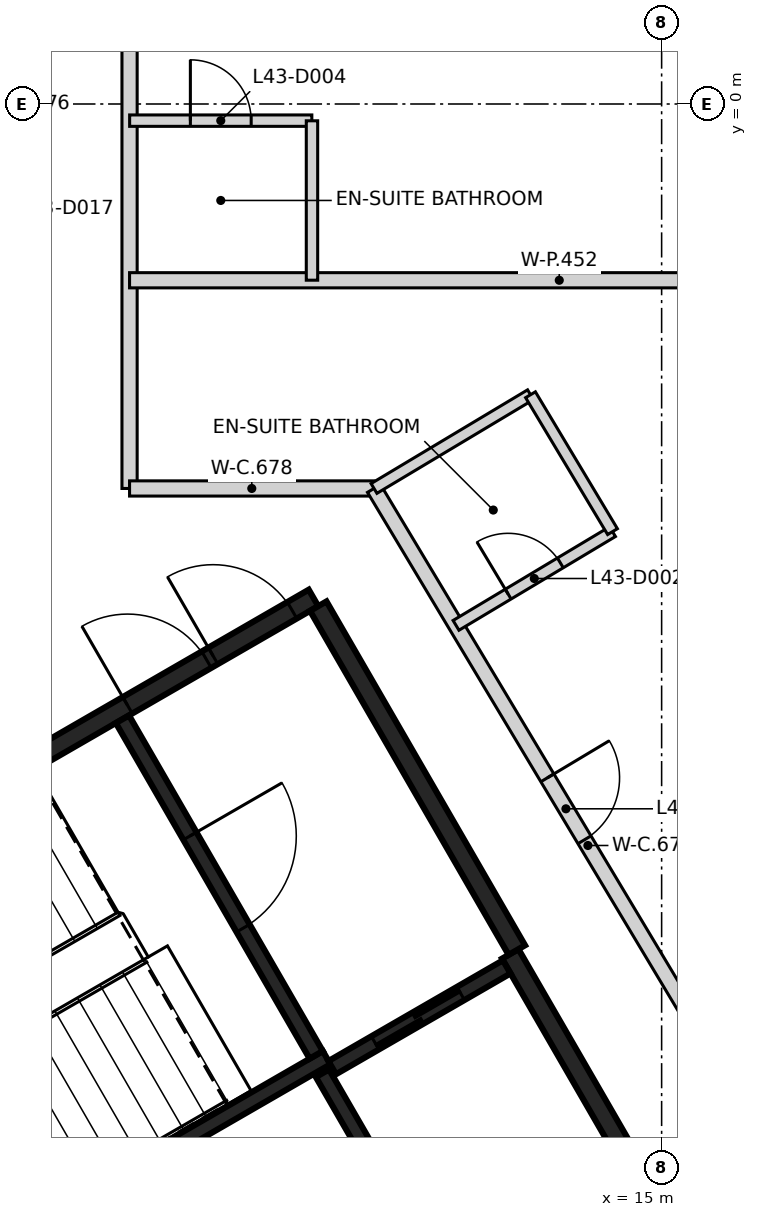
"""IFC4 building model, lengths in metres.
Left out: names, types, materials, properties, quantities, classifications, styles, units other than length and angle.
Written with IfcOpenShell. Run it as: python <this file> out.ifc"""

import sys

from ifc_helpers import new_model, si_unit, direction, frame, frame_2d, origin, place, context, subcontext, project, spatial, rectangle, extrude, element, fill, save


model = new_model("IFC4")
c1 = context("Model", 3, precision=1e-05, world=origin(), true_north=direction((0.0, 1.0)))
c2 = subcontext(c1, "Body", "Model", "MODEL_VIEW")
j1 = project(units=[si_unit("LENGTHUNIT", "METRE"), si_unit("PLANEANGLEUNIT", "RADIAN")], contexts=[c1])
p1 = place(None, origin())
s1 = spatial("IfcSite", under=j1, at=p1, CompositionType="ELEMENT")
p2 = place(p1, origin())
s2 = spatial("IfcBuilding", under=s1, at=p2, CompositionType="ELEMENT")
p3 = place(p2, frame((0.0, 0.0, 175.6)))
s3 = spatial("IfcBuildingStorey", under=s2, at=p3, CompositionType="ELEMENT", Elevation=175.6)
p4 = place(p3, frame((0.417, -12.273, 0.0), z_axis=(0.0, 0.0, 1.0), x_axis=(0.866021906294, 0.500006057782, 0.0)))
e1 = element("IfcWall", 1, at=p4, inside=s3, PredefinedType="SHEAR", context=c2, shape_type="SweptSolid", body=[
    extrude(rectangle(XDim=11.55, YDim=0.25, at=frame_2d((5.775, 0.0))), origin(), (0.0, 0.0, 1.0), 3.25),
])
p5 = place(p4, frame((10.025, 0.0, 0.0)))
e2 = element("IfcOpeningElement", 2, at=p5, cuts=e1, PredefinedType="OPENING", context=c2, shape_type="SweptSolid", body=[
    extrude(rectangle(XDim=1.2, YDim=2.1, at=frame_2d((0.6, 1.05))), frame((0.0, 0.135, 0.0), z_axis=(0.0, -1.0, 0.0), x_axis=(1.0, 0.0, 0.0)), (0.0, 0.0, 1.0), 0.27),
])
p6 = place(p4, frame((8.725, 0.0, 0.0)))
e3 = element("IfcOpeningElement", 3, at=p6, cuts=e1, PredefinedType="OPENING", context=c2, shape_type="SweptSolid", body=[
    extrude(rectangle(XDim=1.2, YDim=2.1, at=frame_2d((0.6, 1.05))), frame((0.0, 0.135, 0.0), z_axis=(0.0, -1.0, 0.0), x_axis=(1.0, 0.0, 0.0)), (0.0, 0.0, 1.0), 0.27),
])
p7 = place(p3, frame((13.008, -11.181, 0.0), z_axis=(0.0, 0.0, 1.0), x_axis=(0.500004234368, -0.866022959057, 0.0)))
e4 = element("IfcWall", 4, at=p7, inside=s3, PredefinedType="SHEAR", context=c2, shape_type="SweptSolid", body=[
    extrude(rectangle(XDim=6.25, YDim=0.25, at=frame_2d((3.125, 0.0))), origin(), (0.0, 0.0, 1.0), 3.25),
])
p8 = place(p7, frame((3.563, 0.0, 0.0)))
e5 = element("IfcOpeningElement", 5, at=p8, cuts=e4, PredefinedType="OPENING", context=c2, shape_type="SweptSolid", body=[
    extrude(rectangle(XDim=1.0, YDim=2.1, at=frame_2d((0.5, 1.05))), frame((0.0, 0.135, 0.0), z_axis=(0.0, -1.0, 0.0), x_axis=(1.0, 0.0, 0.0)), (0.0, 0.0, 1.0), 0.27),
])
p9 = place(p3, frame((10.483, -6.606, 0.0), z_axis=(0.0, 0.0, 1.0), x_axis=(0.49999885962, -0.866026062182, 0.0)))
e6 = element("IfcWall", 6, at=p9, inside=s3, PredefinedType="SHEAR", context=c2, shape_type="SweptSolid", body=[
    extrude(rectangle(XDim=5.225, YDim=0.25, at=frame_2d((2.612, 0.0))), origin(), (0.0, 0.0, 1.0), 3.25),
])
p10 = place(p3, frame((5.526, -15.472, 0.0), z_axis=(0.0, 0.0, 1.0), x_axis=(0.866041752167, 0.499971682701, 0.0)))
e7 = element("IfcWall", 7, at=p10, inside=s3, PredefinedType="SHEAR", context=c2, shape_type="SweptSolid", body=[
    extrude(rectangle(XDim=5.851, YDim=0.2, at=frame_2d((2.925, 0.0))), origin(), (0.0, 0.0, 1.0), 3.25),
])
p11 = place(p3, frame((7.906, -8.094, 0.0), z_axis=(0.0, 0.0, 1.0), x_axis=(0.500027839223, -0.866009330205, 0.0)))
e8 = element("IfcWall", 8, at=p11, inside=s3, PredefinedType="SHEAR", context=c2, shape_type="SweptSolid", body=[
    extrude(rectangle(XDim=5.098, YDim=0.2, at=frame_2d((2.549, 0.0))), origin(), (0.0, 0.0, 1.0), 3.25),
])
p12 = place(p11, frame((1.774, 0.0, 0.0)))
e9 = element("IfcOpeningElement", 9, at=p12, cuts=e8, PredefinedType="OPENING", context=c2, shape_type="SweptSolid", body=[
    extrude(rectangle(XDim=1.4, YDim=2.1, at=frame_2d((0.7, 1.05))), frame((0.0, 0.11, 0.0), z_axis=(0.0, -1.0, 0.0), x_axis=(1.0, 0.0, 0.0)), (0.0, 0.0, 1.0), 0.22),
])
p13 = place(p3, frame((12.088, -15.437, 0.0), z_axis=(0.0, 0.0, 1.0), x_axis=(-0.500026960575, 0.86600983753, 0.0)))
e10 = element("IfcWall", 10, at=p13, inside=s3, PredefinedType="SHEAR", context=c2, shape_type="SweptSolid", body=[
    extrude(rectangle(XDim=3.1, YDim=0.2, at=frame_2d((1.55, 0.0))), origin(), (0.0, 0.0, 1.0), 3.25),
])
p14 = place(p3, frame((10.666, -12.678, 0.0), z_axis=(0.0, 0.0, 1.0), x_axis=(0.866018407898, 0.500012117035, 0.0)))
e11 = element("IfcWall", 11, at=p14, inside=s3, PredefinedType="SHEAR", context=c2, shape_type="SweptSolid", body=[
    extrude(rectangle(XDim=2.651, YDim=0.2, at=frame_2d((1.325, 0.0))), origin(), (0.0, 0.0, 1.0), 3.25),
])
p15 = place(p14, frame((0.652, 0.0, 0.0)))
e12 = element("IfcOpeningElement", 12, at=p15, cuts=e11, PredefinedType="OPENING", context=c2, shape_type="SweptSolid", body=[
    extrude(rectangle(XDim=1.3, YDim=2.1, at=frame_2d((0.65, 1.05))), frame((0.0, 0.11, 0.0), z_axis=(0.0, -1.0, 0.0), x_axis=(1.0, 0.0, 0.0)), (0.0, 0.0, 1.0), 0.22),
])
p16 = place(p3, frame((8.0, -5.058, 0.0), z_axis=(0.0, 0.0, 1.0), x_axis=(0.0, 1.0, 0.0)))
e13 = element("IfcWall", 13, at=p16, inside=s3, PredefinedType="PARTITIONING", context=c2, shape_type="SweptSolid", body=[
    extrude(rectangle(XDim=12.74, YDim=0.2, at=frame_2d((6.37, 0.0))), origin(), (0.0, 0.0, 1.0), 3.25),
])
p17 = place(p16, frame((9.508, 0.0, 0.0)))
e14 = element("IfcOpeningElement", 14, at=p17, cuts=e13, PredefinedType="OPENING", context=c2, shape_type="SweptSolid", body=[
    extrude(rectangle(XDim=0.95, YDim=2.1, at=frame_2d((0.475, 1.05))), frame((0.0, 0.11, 0.0), z_axis=(0.0, -1.0, 0.0), x_axis=(1.0, 0.0, 0.0)), (0.0, 0.0, 1.0), 0.22),
])
p18 = place(p3, frame((8.0, -5.058, 0.0), z_axis=(0.0, 0.0, 1.0), x_axis=(1.0, 0.0, 0.0)))
e15 = element("IfcWall", 15, at=p18, inside=s3, PredefinedType="PARTITIONING", context=c2, shape_type="SweptSolid", body=[
    extrude(rectangle(XDim=3.216, YDim=0.2, at=frame_2d((1.608, 0.0))), origin(), (0.0, 0.0, 1.0), 3.25),
])
p19 = place(p3, frame((11.216, -5.058, 0.0), z_axis=(0.0, 0.0, 1.0), x_axis=(0.51393500197, -0.857829128527, 0.0)))
e16 = element("IfcWall", 16, at=p19, inside=s3, PredefinedType="PARTITIONING", context=c2, shape_type="SweptSolid", body=[
    extrude(rectangle(XDim=10.951, YDim=0.2, at=frame_2d((5.475, 0.0))), origin(), (0.0, 0.0, 1.0), 3.25),
])
p20 = place(p19, frame((4.438, 0.0, 0.0)))
e17 = element("IfcOpeningElement", 17, at=p20, cuts=e16, PredefinedType="OPENING", context=c2, shape_type="SweptSolid", body=[
    extrude(rectangle(XDim=0.95, YDim=2.1, at=frame_2d((0.475, 1.05))), frame((0.0, 0.11, 0.0), z_axis=(0.0, -1.0, 0.0), x_axis=(1.0, 0.0, 0.0)), (0.0, 0.0, 1.0), 0.22),
])
p21 = place(p3, frame((8.0, -2.319, 0.0), z_axis=(0.0, 0.0, 1.0), x_axis=(1.0, 0.0, 0.0)))
e18 = element("IfcWall", 18, at=p21, inside=s3, PredefinedType="PARTITIONING", context=c2, shape_type="SweptSolid", body=[
    extrude(rectangle(XDim=11.306, YDim=0.2, at=frame_2d((5.653, 0.0))), origin(), (0.0, 0.0, 1.0), 3.25),
])
p22 = place(p3, frame((8.001, -0.219, 0.0), z_axis=(0.0, 0.0, 1.0), x_axis=(1.0, 0.0, 0.0)))
e19 = element("IfcWall", 19, at=p22, inside=s3, PredefinedType="PARTITIONING", context=c2, shape_type="SweptSolid", body=[
    extrude(rectangle(XDim=2.397, YDim=0.15, at=frame_2d((1.198, 0.0))), origin(), (0.0, 0.0, 1.0), 3.25),
])
p23 = place(p22, frame((0.799, 0.0, 0.0)))
e20 = element("IfcOpeningElement", 20, at=p23, cuts=e19, PredefinedType="OPENING", context=c2, shape_type="SweptSolid", body=[
    extrude(rectangle(XDim=0.8, YDim=2.1, at=frame_2d((0.4, 1.05))), frame((0.0, 0.085, 0.0), z_axis=(0.0, -1.0, 0.0), x_axis=(1.0, 0.0, 0.0)), (0.0, 0.0, 1.0), 0.17),
])
p24 = place(p3, frame((10.4, -2.318, 0.0), z_axis=(0.0, 0.0, 1.0), x_axis=(0.0, 1.0, 0.0)))
e21 = element("IfcWall", 21, at=p24, inside=s3, PredefinedType="PARTITIONING", context=c2, shape_type="SweptSolid", body=[
    extrude(rectangle(XDim=2.097, YDim=0.15, at=frame_2d((1.049, 0.0))), origin(), (0.0, 0.0, 1.0), 3.25),
])
p25 = place(p3, frame((11.216, -5.058, 0.0), z_axis=(0.0, 0.0, 1.0), x_axis=(0.85788762415, 0.51383735202, 0.0)))
e22 = element("IfcWall", 22, at=p25, inside=s3, PredefinedType="PARTITIONING", context=c2, shape_type="SweptSolid", body=[
    extrude(rectangle(XDim=2.4, YDim=0.15, at=frame_2d((1.2, 0.0))), origin(), (0.0, 0.0, 1.0), 3.25),
])
p26 = place(p3, frame((12.295, -6.859, 0.0), z_axis=(0.0, 0.0, 1.0), x_axis=(0.857959316897, 0.513717636985, 0.0)))
e23 = element("IfcWall", 23, at=p26, inside=s3, PredefinedType="PARTITIONING", context=c2, shape_type="SweptSolid", body=[
    extrude(rectangle(XDim=2.4, YDim=0.15, at=frame_2d((1.2, 0.0))), origin(), (0.0, 0.0, 1.0), 3.25),
])
p27 = place(p26, frame((0.8, 0.0, 0.0)))
e24 = element("IfcOpeningElement", 24, at=p27, cuts=e23, PredefinedType="OPENING", context=c2, shape_type="SweptSolid", body=[
    extrude(rectangle(XDim=0.8, YDim=2.1, at=frame_2d((0.4, 1.05))), frame((0.0, 0.085, 0.0), z_axis=(0.0, -1.0, 0.0), x_axis=(1.0, 0.0, 0.0)), (0.0, 0.0, 1.0), 0.17),
])
p28 = place(p3, frame((13.275, -3.825, 0.0), z_axis=(0.0, 0.0, 1.0), x_axis=(0.513965548914, -0.857810826773, 0.0)))
e25 = element("IfcWall", 25, at=p28, inside=s3, PredefinedType="PARTITIONING", context=c2, shape_type="SweptSolid", body=[
    extrude(rectangle(XDim=2.1, YDim=0.15, at=frame_2d((1.05, 0.0))), origin(), (0.0, 0.0, 1.0), 3.25),
])
p29 = place(p15, origin())
e26 = element("IfcDoor", 26, at=p29, inside=s3, OperationType="SLIDING_TO_LEFT", PredefinedType="DOOR", context=c2, shape_type="SweptSolid", body=[
    extrude(rectangle(XDim=1.3, YDim=2.1, at=frame_2d((0.65, 1.05))), frame((0.0, 0.025, 0.0), z_axis=(0.0, -1.0, 0.0), x_axis=(1.0, 0.0, 0.0)), (0.0, 0.0, 1.0), 0.05),
])
fill(e12, e26)
p30 = place(p5, origin())
e27 = element("IfcDoor", 27, at=p30, inside=s3, OperationType="SINGLE_SWING_LEFT", PredefinedType="DOOR", context=c2, shape_type="SweptSolid", body=[
    extrude(rectangle(XDim=1.2, YDim=2.1, at=frame_2d((0.6, 1.05))), frame((0.0, 0.025, 0.0), z_axis=(0.0, -1.0, 0.0), x_axis=(1.0, 0.0, 0.0)), (0.0, 0.0, 1.0), 0.05),
])
fill(e2, e27)
p31 = place(p6, origin())
e28 = element("IfcDoor", 28, at=p31, inside=s3, OperationType="SINGLE_SWING_RIGHT", PredefinedType="DOOR", context=c2, shape_type="SweptSolid", body=[
    extrude(rectangle(XDim=1.2, YDim=2.1, at=frame_2d((0.6, 1.05))), frame((0.0, 0.025, 0.0), z_axis=(0.0, -1.0, 0.0), x_axis=(1.0, 0.0, 0.0)), (0.0, 0.0, 1.0), 0.05),
])
fill(e3, e28)
p32 = place(p12, origin())
e29 = element("IfcDoor", 29, at=p32, inside=s3, OperationType="SINGLE_SWING_LEFT", PredefinedType="DOOR", context=c2, shape_type="SweptSolid", body=[
    extrude(rectangle(XDim=1.4, YDim=2.1, at=frame_2d((0.7, 1.05))), frame((0.0, 0.025, 0.0), z_axis=(0.0, -1.0, 0.0), x_axis=(1.0, 0.0, 0.0)), (0.0, 0.0, 1.0), 0.05),
])
fill(e9, e29)
p33 = place(p20, origin())
e30 = element("IfcDoor", 30, at=p33, inside=s3, OperationType="SINGLE_SWING_LEFT", PredefinedType="DOOR", context=c2, shape_type="SweptSolid", body=[
    extrude(rectangle(XDim=0.95, YDim=2.1, at=frame_2d((0.475, 1.05))), frame((0.0, 0.025, 0.0), z_axis=(0.0, -1.0, 0.0), x_axis=(1.0, 0.0, 0.0)), (0.0, 0.0, 1.0), 0.05),
])
fill(e17, e30)
p34 = place(p27, frame((0.8, 0.0, 0.0), z_axis=(0.0, 0.0, 1.0), x_axis=(-1.0, 0.0, 0.0)))
e31 = element("IfcDoor", 31, at=p34, inside=s3, OperationType="SINGLE_SWING_LEFT", PredefinedType="DOOR", context=c2, shape_type="SweptSolid", body=[
    extrude(rectangle(XDim=0.8, YDim=2.1, at=frame_2d((0.4, 1.05))), frame((0.0, 0.025, 0.0), z_axis=(0.0, -1.0, 0.0), x_axis=(1.0, 0.0, 0.0)), (0.0, 0.0, 1.0), 0.05),
])
fill(e24, e31)
p35 = place(p23, origin())
e32 = element("IfcDoor", 32, at=p35, inside=s3, OperationType="SINGLE_SWING_LEFT", PredefinedType="DOOR", context=c2, shape_type="SweptSolid", body=[
    extrude(rectangle(XDim=0.8, YDim=2.1, at=frame_2d((0.4, 1.05))), frame((0.0, 0.025, 0.0), z_axis=(0.0, -1.0, 0.0), x_axis=(1.0, 0.0, 0.0)), (0.0, 0.0, 1.0), 0.05),
])
fill(e20, e32)
save(model, sys.argv[1])
